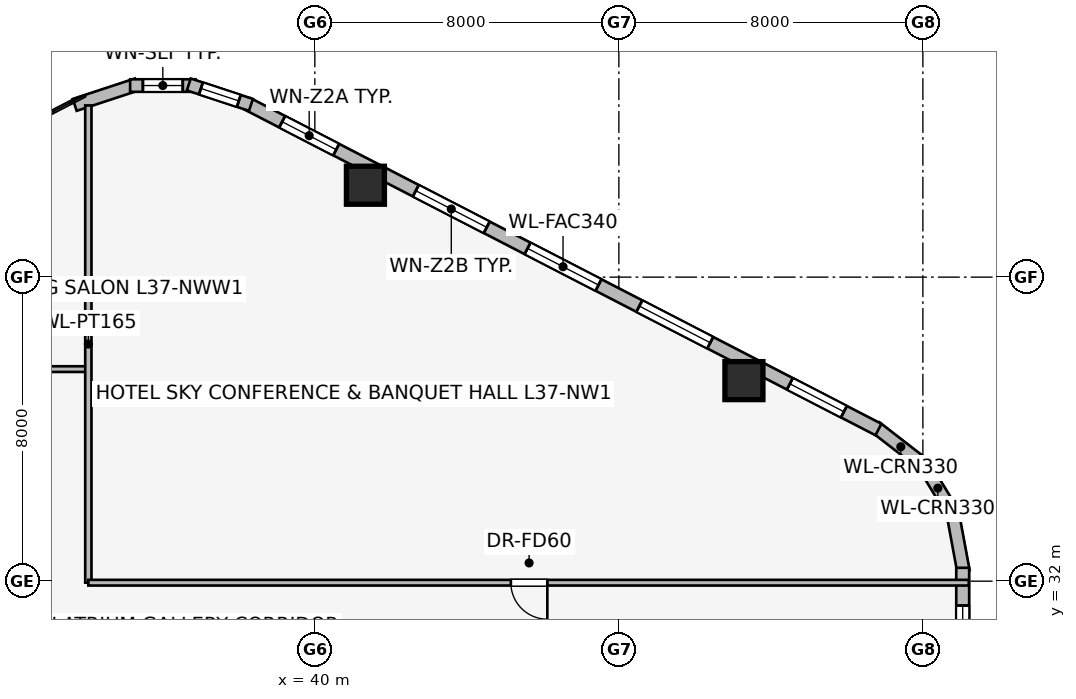
"""IFC4 building model, lengths in metres.
Left out: names, types, materials, properties, quantities, classifications, styles, units other than length and angle.
Written with IfcOpenShell. Run it as: python <this file> out.ifc"""

import sys

from ifc_helpers import new_model, si_unit, direction, frame, frame_2d, origin, origin_2d, place, context, subcontext, project, spatial, rectangle, extrude, element, fill, save


model = new_model("IFC4")
c1 = context("Model", 3, precision=1e-05, world=origin(), true_north=direction((0.0, 1.0)))
c2 = subcontext(c1, "Body", "Model", "MODEL_VIEW")
j1 = project(units=[si_unit("LENGTHUNIT", "METRE"), si_unit("PLANEANGLEUNIT", "RADIAN")], contexts=[c1])
p1 = place(None, origin())
s1 = spatial("IfcSite", under=j1, at=p1, CompositionType="ELEMENT")
p2 = place(p1, origin())
s2 = spatial("IfcBuilding", under=s1, at=p2, CompositionType="ELEMENT")
p3 = place(p2, frame((0.0, 0.0, 139.5)))
s3 = spatial("IfcBuildingStorey", under=s2, at=p3, CompositionType="ELEMENT", Elevation=139.5)
for number, where, z_axis, x_axis in (
    (1, (51.291, 37.277, 0.0), (0.0, 0.0, 1.0), (1.0, 0.0, 0.0)),
    (2, (41.331, 42.418, 0.0), (0.0, 0.0, 1.0), (1.0, 0.0, 0.0)),
):
    element("IfcColumn", number, at=place(p3, frame(where, z_axis=z_axis, x_axis=x_axis)), inside=s3, PredefinedType="COLUMN", context=c2, shape_type="SweptSolid", body=[
        extrude(rectangle(XDim=1.0, YDim=1.0, at=origin_2d()), origin(), (0.0, 0.0, 1.0), 3.45),
    ])
p4 = place(p3, frame((54.757, 36.05, 0.0), z_axis=(0.0, 0.0, 1.0), x_axis=(0.790621329885, -0.612305408053, 0.0)))
e3 = element("IfcWall", 3, at=p4, inside=s3, PredefinedType="STANDARD", context=c2, shape_type="SweptSolid", body=[
    extrude(rectangle(XDim=1.676, YDim=0.33, at=frame_2d((0.838, 0.0))), origin(), (0.0, 0.0, 1.0), 3.16),
])
p5 = place(p3, frame((55.957, 35.164, 0.0), z_axis=(0.0, 0.0, 1.0), x_axis=(0.520519429557, -0.853849824883, 0.0)))
e4 = element("IfcWall", 4, at=p5, inside=s3, PredefinedType="STANDARD", context=c2, shape_type="SweptSolid", body=[
    extrude(rectangle(XDim=1.677, YDim=0.33, at=frame_2d((0.839, 0.0))), origin(), (0.0, 0.0, 1.0), 3.16),
])
p6 = place(p3, frame((56.763, 33.907, 0.0), z_axis=(0.0, 0.0, 1.0), x_axis=(0.181984991895, -0.983301308209, 0.0)))
e5 = element("IfcWall", 5, at=p6, inside=s3, PredefinedType="STANDARD", context=c2, shape_type="SweptSolid", body=[
    extrude(rectangle(XDim=1.677, YDim=0.33, at=frame_2d((0.838, 0.0))), origin(), (0.0, 0.0, 1.0), 3.16),
])
p7 = place(p3, frame((38.231, 44.558, 0.0), z_axis=(0.0, 0.0, 1.0), x_axis=(0.888613612362, -0.458656568606, 0.0)))
e6 = element("IfcWall", 6, at=p7, inside=s3, PredefinedType="STANDARD", context=c2, shape_type="SweptSolid", body=[
    extrude(rectangle(XDim=18.681, YDim=0.34, at=frame_2d((9.34, 0.0))), origin(), (0.0, 0.0, 1.0), 3.16),
])
p8 = place(p7, frame((1.023, 0.0, 0.75)))
e7 = element("IfcOpeningElement", 7, at=p8, cuts=e6, PredefinedType="OPENING", context=c2, shape_type="SweptSolid", body=[
    extrude(rectangle(XDim=1.6, YDim=1.55, at=frame_2d((0.8, 0.775))), frame((0.0, 0.18, 0.0), z_axis=(0.0, -1.0, 0.0), x_axis=(1.0, 0.0, 0.0)), (0.0, 0.0, 1.0), 0.36),
])
p9 = place(p7, frame((4.981, 0.0, 0.75)))
e8 = element("IfcOpeningElement", 8, at=p9, cuts=e6, PredefinedType="OPENING", context=c2, shape_type="SweptSolid", body=[
    extrude(rectangle(XDim=2.1, YDim=1.5, at=frame_2d((1.05, 0.75))), frame((0.0, 0.18, 0.0), z_axis=(0.0, -1.0, 0.0), x_axis=(1.0, 0.0, 0.0)), (0.0, 0.0, 1.0), 0.36),
])
p10 = place(p7, frame((8.29, 0.0, 0.75)))
e9 = element("IfcOpeningElement", 9, at=p10, cuts=e6, PredefinedType="OPENING", context=c2, shape_type="SweptSolid", body=[
    extrude(rectangle(XDim=2.1, YDim=1.5, at=frame_2d((1.05, 0.75))), frame((0.0, 0.18, 0.0), z_axis=(0.0, -1.0, 0.0), x_axis=(1.0, 0.0, 0.0)), (0.0, 0.0, 1.0), 0.36),
])
p11 = place(p7, frame((11.6, 0.0, 0.75)))
e10 = element("IfcOpeningElement", 10, at=p11, cuts=e6, PredefinedType="OPENING", context=c2, shape_type="SweptSolid", body=[
    extrude(rectangle(XDim=2.1, YDim=1.5, at=frame_2d((1.05, 0.75))), frame((0.0, 0.18, 0.0), z_axis=(0.0, -1.0, 0.0), x_axis=(1.0, 0.0, 0.0)), (0.0, 0.0, 1.0), 0.36),
])
p12 = place(p7, frame((16.058, 0.0, 0.75)))
e11 = element("IfcOpeningElement", 11, at=p12, cuts=e6, PredefinedType="OPENING", context=c2, shape_type="SweptSolid", body=[
    extrude(rectangle(XDim=1.6, YDim=1.55, at=frame_2d((0.8, 0.775))), frame((0.0, 0.18, 0.0), z_axis=(0.0, -1.0, 0.0), x_axis=(1.0, 0.0, 0.0)), (0.0, 0.0, 1.0), 0.36),
])
p13 = place(p3, frame((33.681, 44.532, 0.0), z_axis=(0.0, 0.0, 1.0), x_axis=(0.949937416267, 0.312440242569, 0.0)))
e12 = element("IfcWall", 12, at=p13, inside=s3, PredefinedType="STANDARD", context=c2, shape_type="SweptSolid", body=[
    extrude(rectangle(XDim=1.722, YDim=0.33, at=frame_2d((0.861, 0.0))), origin(), (0.0, 0.0, 1.0), 3.16),
])
p14 = place(p3, frame((35.139, 45.041, 0.0), z_axis=(0.0, 0.0, 1.0), x_axis=(1.0, 0.0, 0.0)))
e13 = element("IfcWall", 13, at=p14, inside=s3, PredefinedType="STANDARD", context=c2, shape_type="SweptSolid", body=[
    extrude(rectangle(XDim=1.722, YDim=0.33, at=frame_2d((0.861, 0.0))), origin(), (0.0, 0.0, 1.0), 3.16),
])
p15 = place(p14, frame((0.336, 0.0, 0.75)))
e14 = element("IfcOpeningElement", 14, at=p15, cuts=e13, PredefinedType="OPENING", context=c2, shape_type="SweptSolid", body=[
    extrude(rectangle(XDim=1.05, YDim=1.4, at=frame_2d((0.525, 0.7))), frame((0.0, 0.175, 0.0), z_axis=(0.0, -1.0, 0.0), x_axis=(1.0, 0.0, 0.0)), (0.0, 0.0, 1.0), 0.35),
])
p16 = place(p3, frame((36.683, 45.07, 0.0), z_axis=(0.0, 0.0, 1.0), x_axis=(0.949937416267, -0.312440242569, 0.0)))
e15 = element("IfcWall", 15, at=p16, inside=s3, PredefinedType="STANDARD", context=c2, shape_type="SweptSolid", body=[
    extrude(rectangle(XDim=1.722, YDim=0.33, at=frame_2d((0.861, 0.0))), origin(), (0.0, 0.0, 1.0), 3.16),
])
p17 = place(p16, frame((0.336, 0.0, 0.75)))
e16 = element("IfcOpeningElement", 16, at=p17, cuts=e15, PredefinedType="OPENING", context=c2, shape_type="SweptSolid", body=[
    extrude(rectangle(XDim=1.05, YDim=1.4, at=frame_2d((0.525, 0.7))), frame((0.0, 0.175, 0.0), z_axis=(0.0, -1.0, 0.0), x_axis=(1.0, 0.0, 0.0)), (0.0, 0.0, 1.0), 0.35),
])
p18 = place(p3, frame((57.048, 32.352, 0.0), z_axis=(0.0, 0.0, 1.0), x_axis=(0.0, -1.0, 0.0)))
e17 = element("IfcWall", 17, at=p18, inside=s3, PredefinedType="STANDARD", context=c2, shape_type="SweptSolid", body=[
    extrude(rectangle(XDim=16.704, YDim=0.34, at=frame_2d((8.352, 0.0))), origin(), (0.0, 0.0, 1.0), 3.16),
])
p19 = place(p18, frame((0.992, 0.0, 0.75)))
e18 = element("IfcOpeningElement", 18, at=p19, cuts=e17, PredefinedType="OPENING", context=c2, shape_type="SweptSolid", body=[
    extrude(rectangle(XDim=1.05, YDim=1.4, at=frame_2d((0.525, 0.7))), frame((0.0, 0.18, 0.0), z_axis=(0.0, -1.0, 0.0), x_axis=(1.0, 0.0, 0.0)), (0.0, 0.0, 1.0), 0.36),
])
p20 = place(p18, frame((4.935, 0.0, 0.75)))
e19 = element("IfcOpeningElement", 19, at=p20, cuts=e17, PredefinedType="OPENING", context=c2, shape_type="SweptSolid", body=[
    extrude(rectangle(XDim=2.1, YDim=1.5, at=frame_2d((1.05, 0.75))), frame((0.0, 0.18, 0.0), z_axis=(0.0, -1.0, 0.0), x_axis=(1.0, 0.0, 0.0)), (0.0, 0.0, 1.0), 0.36),
])
p21 = place(p18, frame((9.919, 0.0, 0.75)))
e20 = element("IfcOpeningElement", 20, at=p21, cuts=e17, PredefinedType="OPENING", context=c2, shape_type="SweptSolid", body=[
    extrude(rectangle(XDim=1.6, YDim=1.55, at=frame_2d((0.8, 0.775))), frame((0.0, 0.18, 0.0), z_axis=(0.0, -1.0, 0.0), x_axis=(1.0, 0.0, 0.0)), (0.0, 0.0, 1.0), 0.36),
])
p22 = place(p18, frame((14.702, 0.0, 0.75)))
e21 = element("IfcOpeningElement", 21, at=p22, cuts=e17, PredefinedType="OPENING", context=c2, shape_type="SweptSolid", body=[
    extrude(rectangle(XDim=1.05, YDim=1.4, at=frame_2d((0.525, 0.7))), frame((0.0, 0.18, 0.0), z_axis=(0.0, -1.0, 0.0), x_axis=(1.0, 0.0, 0.0)), (0.0, 0.0, 1.0), 0.36),
])
p23 = place(p3, frame((34.0, 37.58, 0.0), z_axis=(0.0, 0.0, 1.0), x_axis=(-1.0, 0.0, 0.0)))
e22 = element("IfcWall", 22, at=p23, inside=s3, PredefinedType="PARTITIONING", context=c2, shape_type="SweptSolid", body=[
    extrude(rectangle(XDim=13.707, YDim=0.15, at=frame_2d((6.854, 0.0))), origin(), (0.0, 0.0, 1.0), 2.627),
])
p24 = place(p23, frame((5.195, 0.0, 0.0)))
e23 = element("IfcOpeningElement", 23, at=p24, cuts=e22, PredefinedType="OPENING", context=c2, shape_type="SweptSolid", body=[
    extrude(rectangle(XDim=0.96, YDim=2.0, at=frame_2d((0.48, 1.0))), frame((0.0, 0.085, 0.0), z_axis=(0.0, -1.0, 0.0), x_axis=(1.0, 0.0, 0.0)), (0.0, 0.0, 1.0), 0.17),
])
p25 = place(p3, frame((34.04, 31.96, 0.0), z_axis=(0.0, 0.0, 1.0), x_axis=(0.0, 1.0, 0.0)))
e24 = element("IfcWall", 24, at=p25, inside=s3, PredefinedType="PARTITIONING", context=c2, shape_type="SweptSolid", body=[
    extrude(rectangle(XDim=12.558, YDim=0.165, at=frame_2d((6.279, 0.0))), origin(), (0.0, 0.0, 1.0), 3.16),
])
p26 = place(p3, frame((57.208, 31.96, 0.0), z_axis=(0.0, 0.0, 1.0), x_axis=(-1.0, 0.0, 0.0)))
e25 = element("IfcWall", 25, at=p26, inside=s3, PredefinedType="PARTITIONING", context=c2, shape_type="SweptSolid", body=[
    extrude(rectangle(XDim=23.168, YDim=0.15, at=frame_2d((11.584, 0.0))), origin(), (0.0, 0.0, 1.0), 3.16),
])
p27 = place(p26, frame((11.09, 0.0, 0.0)))
e26 = element("IfcOpeningElement", 26, at=p27, cuts=e25, PredefinedType="OPENING", context=c2, shape_type="SweptSolid", body=[
    extrude(rectangle(XDim=0.96, YDim=2.0, at=frame_2d((0.48, 1.0))), frame((0.0, 0.085, 0.0), z_axis=(0.0, -1.0, 0.0), x_axis=(1.0, 0.0, 0.0)), (0.0, 0.0, 1.0), 0.17),
])
p28 = place(p8, origin())
e27 = element("IfcWindow", 27, at=p28, inside=s3, PartitioningType="SINGLE_PANEL", PredefinedType="WINDOW", context=c2, shape_type="SweptSolid", body=[
    extrude(rectangle(XDim=1.6, YDim=1.55, at=frame_2d((0.8, 0.775))), frame((0.0, 0.03, 0.0), z_axis=(0.0, -1.0, 0.0), x_axis=(1.0, 0.0, 0.0)), (0.0, 0.0, 1.0), 0.06),
])
fill(e7, e27)
p29 = place(p9, origin())
e28 = element("IfcWindow", 28, at=p29, inside=s3, PartitioningType="SINGLE_PANEL", PredefinedType="WINDOW", context=c2, shape_type="SweptSolid", body=[
    extrude(rectangle(XDim=2.1, YDim=1.5, at=frame_2d((1.05, 0.75))), frame((0.0, 0.03, 0.0), z_axis=(0.0, -1.0, 0.0), x_axis=(1.0, 0.0, 0.0)), (0.0, 0.0, 1.0), 0.06),
])
fill(e8, e28)
p30 = place(p10, origin())
e29 = element("IfcWindow", 29, at=p30, inside=s3, PartitioningType="SINGLE_PANEL", PredefinedType="WINDOW", context=c2, shape_type="SweptSolid", body=[
    extrude(rectangle(XDim=2.1, YDim=1.5, at=frame_2d((1.05, 0.75))), frame((0.0, 0.03, 0.0), z_axis=(0.0, -1.0, 0.0), x_axis=(1.0, 0.0, 0.0)), (0.0, 0.0, 1.0), 0.06),
])
fill(e9, e29)
p31 = place(p11, origin())
e30 = element("IfcWindow", 30, at=p31, inside=s3, PartitioningType="SINGLE_PANEL", PredefinedType="WINDOW", context=c2, shape_type="SweptSolid", body=[
    extrude(rectangle(XDim=2.1, YDim=1.5, at=frame_2d((1.05, 0.75))), frame((0.0, 0.03, 0.0), z_axis=(0.0, -1.0, 0.0), x_axis=(1.0, 0.0, 0.0)), (0.0, 0.0, 1.0), 0.06),
])
fill(e10, e30)
p32 = place(p12, origin())
e31 = element("IfcWindow", 31, at=p32, inside=s3, PartitioningType="SINGLE_PANEL", PredefinedType="WINDOW", context=c2, shape_type="SweptSolid", body=[
    extrude(rectangle(XDim=1.6, YDim=1.55, at=frame_2d((0.8, 0.775))), frame((0.0, 0.03, 0.0), z_axis=(0.0, -1.0, 0.0), x_axis=(1.0, 0.0, 0.0)), (0.0, 0.0, 1.0), 0.06),
])
fill(e11, e31)
p33 = place(p15, origin())
e32 = element("IfcWindow", 32, at=p33, inside=s3, PartitioningType="SINGLE_PANEL", PredefinedType="WINDOW", context=c2, shape_type="SweptSolid", body=[
    extrude(rectangle(XDim=1.05, YDim=1.4, at=frame_2d((0.525, 0.7))), frame((0.0, 0.03, 0.0), z_axis=(0.0, -1.0, 0.0), x_axis=(1.0, 0.0, 0.0)), (0.0, 0.0, 1.0), 0.06),
])
fill(e14, e32)
p34 = place(p17, origin())
e33 = element("IfcWindow", 33, at=p34, inside=s3, PartitioningType="SINGLE_PANEL", PredefinedType="WINDOW", context=c2, shape_type="SweptSolid", body=[
    extrude(rectangle(XDim=1.05, YDim=1.4, at=frame_2d((0.525, 0.7))), frame((0.0, 0.03, 0.0), z_axis=(0.0, -1.0, 0.0), x_axis=(1.0, 0.0, 0.0)), (0.0, 0.0, 1.0), 0.06),
])
fill(e16, e33)
p35 = place(p19, origin())
e34 = element("IfcWindow", 34, at=p35, inside=s3, PartitioningType="SINGLE_PANEL", PredefinedType="WINDOW", context=c2, shape_type="SweptSolid", body=[
    extrude(rectangle(XDim=1.05, YDim=1.4, at=frame_2d((0.525, 0.7))), frame((0.0, 0.03, 0.0), z_axis=(0.0, -1.0, 0.0), x_axis=(1.0, 0.0, 0.0)), (0.0, 0.0, 1.0), 0.06),
])
fill(e18, e34)
p36 = place(p27, origin())
e35 = element("IfcDoor", 35, at=p36, inside=s3, OperationType="SINGLE_SWING_LEFT", PredefinedType="DOOR", context=c2, shape_type="SweptSolid", body=[
    extrude(rectangle(XDim=0.96, YDim=2.0, at=frame_2d((0.48, 1.0))), frame((0.0, 0.025, 0.0), z_axis=(0.0, -1.0, 0.0), x_axis=(1.0, 0.0, 0.0)), (0.0, 0.0, 1.0), 0.05),
])
fill(e26, e35)
save(model, sys.argv[1])
